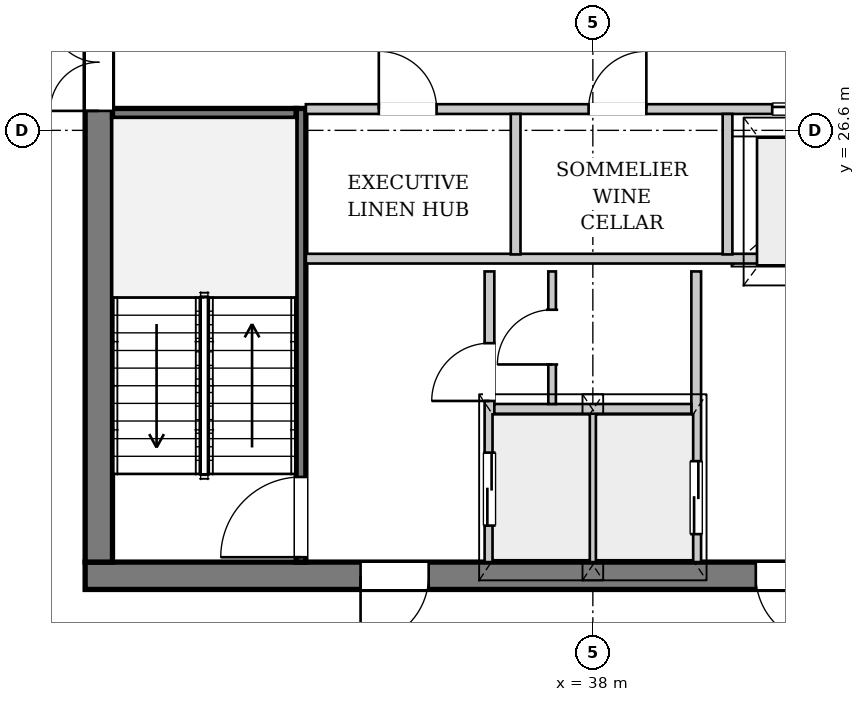
"""IFC4 building model, lengths in metres.
Left out: names, types, materials, properties, quantities, classifications, styles, units other than length and angle.
Written with IfcOpenShell. Run it as: python <this file> out.ifc"""

import sys

from ifc_helpers import new_model, si_unit, direction, frame, frame_2d, origin, place, context, subcontext, project, spatial, rectangle, extrude, source, transform, mapped, element, fill, save


model = new_model("IFC4")
c1 = context("Model", 3, precision=1e-05, world=origin(), true_north=direction((0.0, 1.0)))
c2 = subcontext(c1, "Body", "Model", "MODEL_VIEW")
j1 = project(units=[si_unit("LENGTHUNIT", "METRE"), si_unit("PLANEANGLEUNIT", "RADIAN")], contexts=[c1])
p1 = place(None, origin())
s1 = spatial("IfcSite", under=j1, at=p1, CompositionType="ELEMENT")
p2 = place(p1, origin())
s2 = spatial("IfcBuilding", under=s1, at=p2, CompositionType="ELEMENT")
p3 = place(p2, frame((0.0, 0.0, 266.9)))
s3 = spatial("IfcBuildingStorey", under=s2, at=p3, CompositionType="ELEMENT", Elevation=266.9)
p4 = place(p3, frame((29.189, 13.02, 0.0), z_axis=(0.0, 0.0, 1.0), x_axis=(-0.76674910501, 0.641946890301, 0.0)))
e1 = element("IfcWall", 1, at=p4, inside=s3, PredefinedType="SOLIDWALL", context=c2, shape_type="SweptSolid", body=[
    extrude(rectangle(XDim=17.287, YDim=0.32, at=frame_2d((8.644, 0.0))), origin(), (0.0, 0.0, 1.0), 2.872),
])
p5 = place(p4, frame((4.782, 0.0, 0.0)))
e2 = element("IfcOpeningElement", 2, at=p5, cuts=e1, PredefinedType="OPENING", context=c2, shape_type="SweptSolid", body=[
    extrude(rectangle(XDim=1.5, YDim=2.3, at=frame_2d((0.75, 1.15))), frame((0.0, 0.17, 0.0), z_axis=(0.0, -1.0, 0.0), x_axis=(1.0, 0.0, 0.0)), (0.0, 0.0, 1.0), 0.34),
])
p6 = place(p4, frame((11.492, 0.0, 0.402)))
e3 = element("IfcOpeningElement", 3, at=p6, cuts=e1, PredefinedType="OPENING", context=c2, shape_type="SweptSolid", body=[
    extrude(rectangle(XDim=2.6, YDim=2.35, at=frame_2d((1.3, 1.175))), frame((0.0, 0.17, 0.0), z_axis=(0.0, -1.0, 0.0), x_axis=(1.0, 0.0, 0.0)), (0.0, 0.0, 1.0), 0.34),
])
p7 = place(p3, frame((15.976, 26.276, 0.0), z_axis=(0.0, 0.0, 1.0), x_axis=(0.794029694054, 0.607878972297, 0.0)))
e4 = element("IfcWall", 4, at=p7, inside=s3, PredefinedType="SOLIDWALL", context=c2, shape_type="SweptSolid", body=[
    extrude(rectangle(XDim=21.739, YDim=0.38, at=frame_2d((10.869, 0.0))), origin(), (0.0, 0.0, 1.0), 2.872),
])
p8 = place(p7, frame((7.187, 0.0, 0.502)))
e5 = element("IfcOpeningElement", 5, at=p8, cuts=e4, PredefinedType="OPENING", context=c2, shape_type="SweptSolid", body=[
    extrude(rectangle(XDim=2.2, YDim=2.25, at=frame_2d((1.1, 1.125))), frame((0.0, 0.2, 0.0), z_axis=(0.0, -1.0, 0.0), x_axis=(1.0, 0.0, 0.0)), (0.0, 0.0, 1.0), 0.4),
])
p9 = place(p7, frame((16.752, 0.0, 0.502)))
e6 = element("IfcOpeningElement", 6, at=p9, cuts=e4, PredefinedType="OPENING", context=c2, shape_type="SweptSolid", body=[
    extrude(rectangle(XDim=2.2, YDim=2.25, at=frame_2d((1.1, 1.125))), frame((0.0, 0.2, 0.0), z_axis=(0.0, -1.0, 0.0), x_axis=(1.0, 0.0, 0.0)), (0.0, 0.0, 1.0), 0.4),
])
p10 = place(p3, frame((46.35, 19.275, 0.0), z_axis=(0.0, 0.0, 1.0), x_axis=(-1.0, 0.0, 0.0)))
e7 = element("IfcWall", 7, at=p10, inside=s3, PredefinedType="SHEAR", context=c2, shape_type="SweptSolid", body=[
    extrude(rectangle(XDim=16.7, YDim=0.45, at=frame_2d((8.35, 0.0))), origin(), (0.0, 0.0, 1.0), 3.38),
])
p11 = place(p10, frame((4.55, 0.0, 0.0)))
e8 = element("IfcOpeningElement", 8, at=p11, cuts=e7, PredefinedType="OPENING", context=c2, shape_type="SweptSolid", body=[
    extrude(rectangle(XDim=1.12, YDim=2.25, at=frame_2d((0.56, 1.125))), frame((0.0, 0.235, 0.0), z_axis=(0.0, -1.0, 0.0), x_axis=(1.0, 0.0, 0.0)), (0.0, 0.0, 1.0), 0.47),
])
p12 = place(p10, frame((11.05, 0.0, 0.0)))
e9 = element("IfcOpeningElement", 9, at=p12, cuts=e7, PredefinedType="OPENING", context=c2, shape_type="SweptSolid", body=[
    extrude(rectangle(XDim=1.12, YDim=2.25, at=frame_2d((0.56, 1.125))), frame((0.0, 0.235, 0.0), z_axis=(0.0, -1.0, 0.0), x_axis=(1.0, 0.0, 0.0)), (0.0, 0.0, 1.0), 0.47),
])
p13 = place(p3, frame((29.875, 19.5, 0.0), z_axis=(0.0, 0.0, 1.0), x_axis=(0.0, 1.0, 0.0)))
e10 = element("IfcWall", 10, at=p13, inside=s3, PredefinedType="SHEAR", context=c2, shape_type="SweptSolid", body=[
    extrude(rectangle(XDim=14.2, YDim=0.45, at=frame_2d((7.1, 0.0))), origin(), (0.0, 0.0, 1.0), 3.38),
])
p14 = place(p13, frame((7.42, 0.0, 0.0)))
e11 = element("IfcOpeningElement", 11, at=p14, cuts=e10, PredefinedType="OPENING", context=c2, shape_type="SweptSolid", body=[
    extrude(rectangle(XDim=1.6, YDim=2.2, at=frame_2d((0.8, 1.1))), frame((0.0, 0.235, 0.0), z_axis=(0.0, -1.0, 0.0), x_axis=(1.0, 0.0, 0.0)), (0.0, 0.0, 1.0), 0.47),
])
p15 = place(p3, frame((33.2, 19.5, 0.0), z_axis=(0.0, 0.0, 1.0), x_axis=(0.0, 1.0, 0.0)))
e12 = element("IfcWall", 12, at=p15, inside=s3, PredefinedType="PARTITIONING", context=c2, shape_type="SweptSolid", body=[
    extrude(rectangle(XDim=7.46, YDim=0.16, at=frame_2d((3.73, 0.0))), origin(), (0.0, 0.0, 1.0), 3.38),
])
p16 = place(p15, frame((0.08, 0.0, 0.0)))
e13 = element("IfcOpeningElement", 13, at=p16, cuts=e12, PredefinedType="OPENING", context=c2, shape_type="SweptSolid", body=[
    extrude(rectangle(XDim=1.32, YDim=2.2, at=frame_2d((0.66, 1.1))), frame((0.0, 0.09, 0.0), z_axis=(0.0, -1.0, 0.0), x_axis=(1.0, 0.0, 0.0)), (0.0, 0.0, 1.0), 0.18),
])
p17 = place(p3, frame((30.1, 26.88, 0.0), z_axis=(0.0, 0.0, 1.0), x_axis=(1.0, 0.0, 0.0)))
e14 = element("IfcWall", 14, at=p17, inside=s3, PredefinedType="PARTITIONING", context=c2, shape_type="SweptSolid", body=[
    extrude(rectangle(XDim=3.02, YDim=0.16, at=frame_2d((1.51, 0.0))), origin(), (0.0, 0.0, 1.0), 3.38),
])
p18 = place(p3, frame((36.3, 19.5, 0.0), z_axis=(0.0, 0.0, 1.0), x_axis=(0.0, 1.0, 0.0)))
e15 = element("IfcWall", 15, at=p18, inside=s3, PredefinedType="PARTITIONING", context=c2, shape_type="SweptSolid", body=[
    extrude(rectangle(XDim=4.78, YDim=0.16, at=frame_2d((2.39, 0.0))), origin(), (0.0, 0.0, 1.0), 3.38),
])
p19 = place(p18, frame((0.6, 0.0, 0.0)))
e16 = element("IfcOpeningElement", 16, at=p19, cuts=e15, PredefinedType="OPENING", context=c2, shape_type="SweptSolid", body=[
    extrude(rectangle(XDim=1.2, YDim=2.2, at=frame_2d((0.6, 1.1))), frame((0.0, 0.09, 0.0), z_axis=(0.0, -1.0, 0.0), x_axis=(1.0, 0.0, 0.0)), (0.0, 0.0, 1.0), 0.18),
])
p20 = place(p18, frame((2.65, 0.0, 0.0)))
e17 = element("IfcOpeningElement", 17, at=p20, cuts=e15, PredefinedType="OPENING", context=c2, shape_type="SweptSolid", body=[
    extrude(rectangle(XDim=0.95, YDim=2.1, at=frame_2d((0.475, 1.05))), frame((0.0, 0.09, 0.0), z_axis=(0.0, -1.0, 0.0), x_axis=(1.0, 0.0, 0.0)), (0.0, 0.0, 1.0), 0.18),
])
p21 = place(p3, frame((39.7, 24.28, 0.0), z_axis=(0.0, 0.0, 1.0), x_axis=(0.0, -1.0, 0.0)))
e18 = element("IfcWall", 18, at=p21, inside=s3, PredefinedType="PARTITIONING", context=c2, shape_type="SweptSolid", body=[
    extrude(rectangle(XDim=4.78, YDim=0.16, at=frame_2d((2.39, 0.0))), origin(), (0.0, 0.0, 1.0), 3.38),
])
p22 = place(p21, frame((3.12, 0.0, 0.0)))
e19 = element("IfcOpeningElement", 19, at=p22, cuts=e18, PredefinedType="OPENING", context=c2, shape_type="SweptSolid", body=[
    extrude(rectangle(XDim=1.2, YDim=2.2, at=frame_2d((0.6, 1.1))), frame((0.0, 0.09, 0.0), z_axis=(0.0, -1.0, 0.0), x_axis=(1.0, 0.0, 0.0)), (0.0, 0.0, 1.0), 0.18),
])
p23 = place(p3, frame((38.0, 19.5, 0.0), z_axis=(0.0, 0.0, 1.0), x_axis=(0.0, 1.0, 0.0)))
e20 = element("IfcWall", 20, at=p23, inside=s3, PredefinedType="PARTITIONING", context=c2, shape_type="SweptSolid", body=[
    extrude(rectangle(XDim=2.46, YDim=0.125, at=frame_2d((1.23, 0.0))), origin(), (0.0, 0.0, 1.0), 3.38),
])
p24 = place(p3, frame((36.38, 22.02, 0.0), z_axis=(0.0, 0.0, 1.0), x_axis=(1.0, 0.0, 0.0)))
e21 = element("IfcWall", 21, at=p24, inside=s3, PredefinedType="PARTITIONING", context=c2, shape_type="SweptSolid", body=[
    extrude(rectangle(XDim=3.24, YDim=0.16, at=frame_2d((1.62, 0.0))), origin(), (0.0, 0.0, 1.0), 3.38),
])
p25 = place(p3, frame((33.28, 24.49, 0.0), z_axis=(0.0, 0.0, 1.0), x_axis=(1.0, 0.0, 0.0)))
e22 = element("IfcWall", 22, at=p25, inside=s3, PredefinedType="PARTITIONING", context=c2, shape_type="SweptSolid", body=[
    extrude(rectangle(XDim=9.44, YDim=0.16, at=frame_2d((4.72, 0.0))), origin(), (0.0, 0.0, 1.0), 3.38),
])
p26 = place(p3, frame((37.33, 22.1, 0.0), z_axis=(0.0, 0.0, 1.0), x_axis=(0.0, 1.0, 0.0)))
e23 = element("IfcWall", 23, at=p26, inside=s3, PredefinedType="PARTITIONING", context=c2, shape_type="SweptSolid", body=[
    extrude(rectangle(XDim=2.18, YDim=0.125, at=frame_2d((1.09, 0.0))), origin(), (0.0, 0.0, 1.0), 3.38),
])
p27 = place(p26, frame((0.65, 0.0, 0.0)))
e24 = element("IfcOpeningElement", 24, at=p27, cuts=e23, PredefinedType="OPENING", context=c2, shape_type="SweptSolid", body=[
    extrude(rectangle(XDim=0.9, YDim=2.1, at=frame_2d((0.45, 1.05))), frame((0.0, 0.073, 0.0), z_axis=(0.0, -1.0, 0.0), x_axis=(1.0, 0.0, 0.0)), (0.0, 0.0, 1.0), 0.145),
])
p28 = place(p3, frame((33.28, 26.95, 0.0), z_axis=(0.0, 0.0, 1.0), x_axis=(1.0, 0.0, 0.0)))
e25 = element("IfcWall", 25, at=p28, inside=s3, PredefinedType="PARTITIONING", context=c2, shape_type="SweptSolid", body=[
    extrude(rectangle(XDim=9.44, YDim=0.16, at=frame_2d((4.72, 0.0))), origin(), (0.0, 0.0, 1.0), 3.38),
])
p29 = place(p28, frame((1.2, 0.0, 0.0)))
e26 = element("IfcOpeningElement", 26, at=p29, cuts=e25, PredefinedType="OPENING", context=c2, shape_type="SweptSolid", body=[
    extrude(rectangle(XDim=0.95, YDim=2.1, at=frame_2d((0.475, 1.05))), frame((0.0, 0.09, 0.0), z_axis=(0.0, -1.0, 0.0), x_axis=(1.0, 0.0, 0.0)), (0.0, 0.0, 1.0), 0.18),
])
p30 = place(p28, frame((4.65, 0.0, 0.0)))
e27 = element("IfcOpeningElement", 27, at=p30, cuts=e25, PredefinedType="OPENING", context=c2, shape_type="SweptSolid", body=[
    extrude(rectangle(XDim=0.95, YDim=2.1, at=frame_2d((0.475, 1.05))), frame((0.0, 0.09, 0.0), z_axis=(0.0, -1.0, 0.0), x_axis=(1.0, 0.0, 0.0)), (0.0, 0.0, 1.0), 0.18),
])
p31 = place(p28, frame((7.67, 0.0, 0.0)))
e28 = element("IfcOpeningElement", 28, at=p31, cuts=e25, PredefinedType="OPENING", context=c2, shape_type="SweptSolid", body=[
    extrude(rectangle(XDim=1.1, YDim=2.2, at=frame_2d((0.55, 1.1))), frame((0.0, 0.09, 0.0), z_axis=(0.0, -1.0, 0.0), x_axis=(1.0, 0.0, 0.0)), (0.0, 0.0, 1.0), 0.18),
])
for number, where, z_axis, x_axis in (
    (29, (36.73, 24.56, 0.0), (0.0, 0.0, 1.0), (0.0, 1.0, 0.0)),
    (30, (40.215, 24.56, 0.0), (0.0, 0.0, 1.0), (0.0, 1.0, 0.0)),
):
    element("IfcWall", number, at=place(p3, frame(where, z_axis=z_axis, x_axis=x_axis)), inside=s3, PredefinedType="PARTITIONING", context=c2, shape_type="SweptSolid", body=[
        extrude(rectangle(XDim=2.31, YDim=0.16, at=frame_2d((1.155, 0.0))), origin(), (0.0, 0.0, 1.0), 3.38),
    ])
m1 = source(origin(), c2, "Body", "SweptSolid", [
    extrude(rectangle(XDim=1.12, YDim=2.25, at=frame_2d((0.56, 1.125))), frame((0.0, 0.025, 0.0), z_axis=(0.0, -1.0, 0.0), x_axis=(1.0, 0.0, 0.0)), (0.0, 0.0, 1.0), 0.05),
])
p32 = place(p11, origin())
e31 = element("IfcDoor", 31, at=p32, inside=s3, OperationType="SINGLE_SWING_LEFT", PredefinedType="DOOR", context=c2, shape_type="MappedRepresentation", body=[
    mapped(m1, transform((0.0, 0.0, 0.0), x_axis=(1.0, 0.0, 0.0), y_axis=(0.0, 1.0, 0.0), z_axis=(0.0, 0.0, 1.0), scale=1.0)),
])
fill(e8, e31)
p33 = place(p12, origin())
e32 = element("IfcDoor", 32, at=p33, inside=s3, OperationType="SINGLE_SWING_RIGHT", PredefinedType="DOOR", context=c2, shape_type="MappedRepresentation", body=[
    mapped(m1, transform((0.0, 0.0, 0.0), x_axis=(1.0, 0.0, 0.0), y_axis=(0.0, 1.0, 0.0), z_axis=(0.0, 0.0, 1.0), scale=1.0)),
])
fill(e9, e32)
m2 = source(origin(), c2, "Body", "SweptSolid", [
    extrude(rectangle(XDim=1.6, YDim=2.2, at=frame_2d((0.8, 1.1))), frame((0.0, 0.025, 0.0), z_axis=(0.0, -1.0, 0.0), x_axis=(1.0, 0.0, 0.0)), (0.0, 0.0, 1.0), 0.05),
])
p34 = place(p14, origin())
e33 = element("IfcDoor", 33, at=p34, inside=s3, OperationType="DOUBLE_DOOR_SINGLE_SWING", PredefinedType="DOOR", context=c2, shape_type="MappedRepresentation", body=[
    mapped(m2, transform((0.0, 0.0, 0.0), x_axis=(1.0, 0.0, 0.0), y_axis=(0.0, 1.0, 0.0), z_axis=(0.0, 0.0, 1.0), scale=1.0)),
])
fill(e11, e33)
m3 = source(origin(), c2, "Body", "SweptSolid", [
    extrude(rectangle(XDim=1.32, YDim=2.2, at=frame_2d((0.66, 1.1))), frame((0.0, 0.025, 0.0), z_axis=(0.0, -1.0, 0.0), x_axis=(1.0, 0.0, 0.0)), (0.0, 0.0, 1.0), 0.05),
])
p35 = place(p16, origin())
e34 = element("IfcDoor", 34, at=p35, inside=s3, OperationType="SINGLE_SWING_LEFT", PredefinedType="DOOR", context=c2, shape_type="MappedRepresentation", body=[
    mapped(m3, transform((0.0, 0.0, 0.0), x_axis=(1.0, 0.0, 0.0), y_axis=(0.0, 1.0, 0.0), z_axis=(0.0, 0.0, 1.0), scale=1.0)),
])
fill(e13, e34)
m4 = source(origin(), c2, "Body", "SweptSolid", [
    extrude(rectangle(XDim=1.2, YDim=2.2, at=frame_2d((0.6, 1.1))), frame((0.0, 0.025, 0.0), z_axis=(0.0, -1.0, 0.0), x_axis=(1.0, 0.0, 0.0)), (0.0, 0.0, 1.0), 0.05),
])
p36 = place(p19, origin())
e35 = element("IfcDoor", 35, at=p36, inside=s3, OperationType="DOUBLE_DOOR_SLIDING", PredefinedType="DOOR", context=c2, shape_type="MappedRepresentation", body=[
    mapped(m4, transform((0.0, 0.0, 0.0), x_axis=(1.0, 0.0, 0.0), y_axis=(0.0, 1.0, 0.0), z_axis=(0.0, 0.0, 1.0), scale=1.0)),
])
fill(e16, e35)
m5 = source(origin(), c2, "Body", "SweptSolid", [
    extrude(rectangle(XDim=0.95, YDim=2.1, at=frame_2d((0.475, 1.05))), frame((0.0, 0.025, 0.0), z_axis=(0.0, -1.0, 0.0), x_axis=(1.0, 0.0, 0.0)), (0.0, 0.0, 1.0), 0.05),
])
p37 = place(p20, origin())
e36 = element("IfcDoor", 36, at=p37, inside=s3, OperationType="SINGLE_SWING_LEFT", PredefinedType="DOOR", context=c2, shape_type="MappedRepresentation", body=[
    mapped(m5, transform((0.0, 0.0, 0.0), x_axis=(1.0, 0.0, 0.0), y_axis=(0.0, 1.0, 0.0), z_axis=(0.0, 0.0, 1.0), scale=1.0)),
])
fill(e17, e36)
m6 = source(origin(), c2, "Body", "SweptSolid", [
    extrude(rectangle(XDim=0.9, YDim=2.1, at=frame_2d((0.45, 1.05))), frame((0.0, 0.025, 0.0), z_axis=(0.0, -1.0, 0.0), x_axis=(1.0, 0.0, 0.0)), (0.0, 0.0, 1.0), 0.05),
])
p38 = place(p27, origin())
e37 = element("IfcDoor", 37, at=p38, inside=s3, OperationType="SINGLE_SWING_LEFT", PredefinedType="DOOR", context=c2, shape_type="MappedRepresentation", body=[
    mapped(m6, transform((0.0, 0.0, 0.0), x_axis=(1.0, 0.0, 0.0), y_axis=(0.0, 1.0, 0.0), z_axis=(0.0, 0.0, 1.0), scale=1.0)),
])
fill(e24, e37)
p39 = place(p22, origin())
e38 = element("IfcDoor", 38, at=p39, inside=s3, OperationType="DOUBLE_DOOR_SLIDING", PredefinedType="DOOR", context=c2, shape_type="MappedRepresentation", body=[
    mapped(m4, transform((0.0, 0.0, 0.0), x_axis=(1.0, 0.0, 0.0), y_axis=(0.0, 1.0, 0.0), z_axis=(0.0, 0.0, 1.0), scale=1.0)),
])
fill(e19, e38)
p40 = place(p29, origin())
e39 = element("IfcDoor", 39, at=p40, inside=s3, OperationType="SINGLE_SWING_LEFT", PredefinedType="DOOR", context=c2, shape_type="MappedRepresentation", body=[
    mapped(m5, transform((0.0, 0.0, 0.0), x_axis=(1.0, 0.0, 0.0), y_axis=(0.0, 1.0, 0.0), z_axis=(0.0, 0.0, 1.0), scale=1.0)),
])
fill(e26, e39)
p41 = place(p30, origin())
e40 = element("IfcDoor", 40, at=p41, inside=s3, OperationType="SINGLE_SWING_RIGHT", PredefinedType="DOOR", context=c2, shape_type="MappedRepresentation", body=[
    mapped(m5, transform((0.0, 0.0, 0.0), x_axis=(1.0, 0.0, 0.0), y_axis=(0.0, 1.0, 0.0), z_axis=(0.0, 0.0, 1.0), scale=1.0)),
])
fill(e27, e40)
m7 = source(origin(), c2, "Body", "SweptSolid", [
    extrude(rectangle(XDim=1.1, YDim=2.2, at=frame_2d((0.55, 1.1))), frame((0.0, 0.025, 0.0), z_axis=(0.0, -1.0, 0.0), x_axis=(1.0, 0.0, 0.0)), (0.0, 0.0, 1.0), 0.05),
])
p42 = place(p31, origin())
e41 = element("IfcDoor", 41, at=p42, inside=s3, OperationType="DOUBLE_DOOR_SLIDING", PredefinedType="DOOR", context=c2, shape_type="MappedRepresentation", body=[
    mapped(m7, transform((0.0, 0.0, 0.0), x_axis=(1.0, 0.0, 0.0), y_axis=(0.0, 1.0, 0.0), z_axis=(0.0, 0.0, 1.0), scale=1.0)),
])
fill(e28, e41)
save(model, sys.argv[1])
